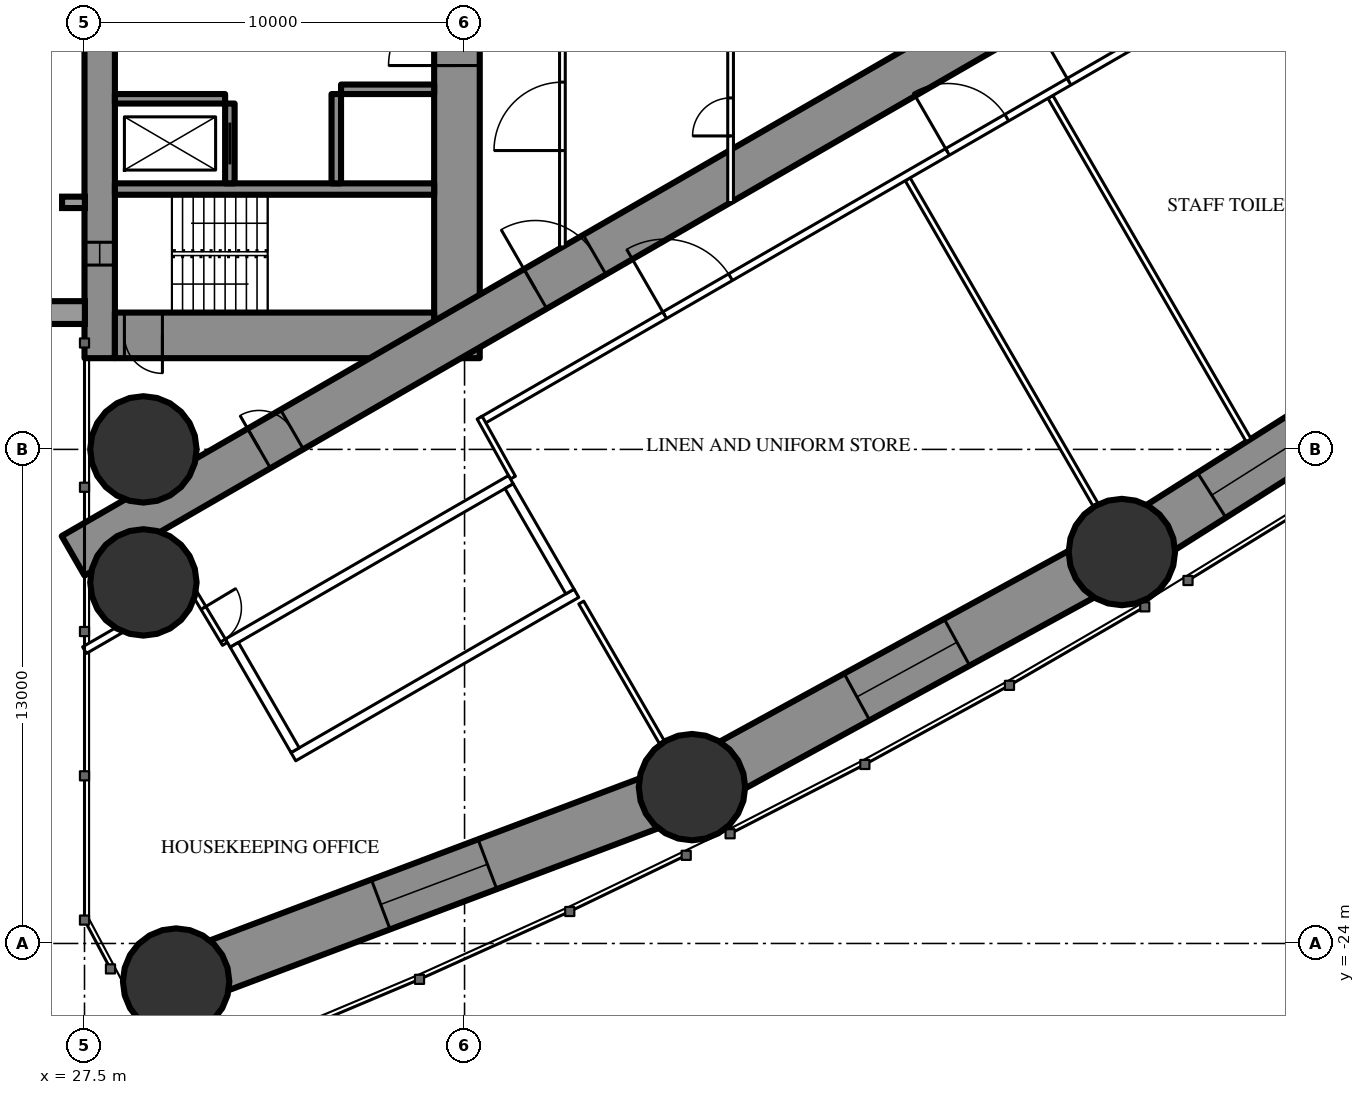
"""IFC4 building model, lengths in metres.
Left out: names, types, materials, properties, quantities, classifications, styles, units other than length and angle.
Written with IfcOpenShell. Run it as: python <this file> out.ifc"""

import sys

from ifc_helpers import new_model, si_unit, direction, frame, frame_2d, origin, origin_2d, place, context, subcontext, project, spatial, rectangle, hollow_circle, extrude, element, fill, save


model = new_model("IFC4")
c1 = context("Model", 3, precision=1e-05, world=origin(), true_north=direction((0.0, 1.0)))
c2 = subcontext(c1, "Body", "Model", "MODEL_VIEW")
j1 = project(units=[si_unit("LENGTHUNIT", "METRE"), si_unit("PLANEANGLEUNIT", "RADIAN")], contexts=[c1])
p1 = place(None, origin())
s1 = spatial("IfcSite", under=j1, at=p1, CompositionType="ELEMENT")
p2 = place(p1, origin())
s2 = spatial("IfcBuilding", under=s1, at=p2, CompositionType="ELEMENT")
p3 = place(p2, frame((0.0, 0.0, 77.5)))
s3 = spatial("IfcBuildingStorey", under=s2, at=p3, CompositionType="ELEMENT", Elevation=77.5)
for number, where, z_axis, x_axis in (
    (1, (29.911, -25.002, 0.0), (0.0, 0.0, 1.0), (1.0, 0.0, 0.0)),
    (2, (29.05, -11.0, 0.0), (0.0, 0.0, 1.0), (1.0, 0.0, 0.0)),
    (3, (29.05, -14.5, 0.0), (0.0, 0.0, 1.0), (1.0, 0.0, 0.0)),
    (4, (43.484, -19.886, 0.0), (0.0, 0.0, 1.0), (1.0, 0.0, 0.0)),
    (5, (54.795, -13.701, 0.0), (0.0, 0.0, 1.0), (1.0, 0.0, 0.0)),
):
    element("IfcColumn", number, at=place(p3, frame(where, z_axis=z_axis, x_axis=x_axis)), inside=s3, PredefinedType="COLUMN", context=c2, shape_type="SweptSolid", body=[
        extrude(hollow_circle(Radius=1.4, WallThickness=0.12, at=origin_2d()), origin(), (0.0, 0.0, 1.0), 3.5),
    ])
p4 = place(p3, frame((27.9, -8.6, 0.0), z_axis=(0.0, 0.0, 1.0), x_axis=(0.0, 1.0, 0.0)))
e6 = element("IfcWall", 6, at=p4, inside=s3, PredefinedType="SHEAR", context=c2, shape_type="SweptSolid", body=[
    extrude(rectangle(XDim=17.2, YDim=0.8, at=frame_2d((8.6, 0.0))), origin(), (0.0, 0.0, 1.0), 3.5),
])
p5 = place(p4, frame((2.45, 0.0, 0.6)))
e7 = element("IfcOpeningElement", 7, at=p5, cuts=e6, PredefinedType="OPENING", context=c2, shape_type="SweptSolid", body=[
    extrude(rectangle(XDim=0.6, YDim=2.1, at=frame_2d((0.3, 1.05))), frame((0.0, 0.41, 0.0), z_axis=(0.0, -1.0, 0.0), x_axis=(1.0, 0.0, 0.0)), (0.0, 0.0, 1.0), 0.82),
])
p6 = place(p4, frame((14.15, 0.0, 0.6)))
e8 = element("IfcOpeningElement", 8, at=p6, cuts=e6, PredefinedType="OPENING", context=c2, shape_type="SweptSolid", body=[
    extrude(rectangle(XDim=0.6, YDim=2.1, at=frame_2d((0.3, 1.05))), frame((0.0, 0.41, 0.0), z_axis=(0.0, -1.0, 0.0), x_axis=(1.0, 0.0, 0.0)), (0.0, 0.0, 1.0), 0.82),
])
p7 = place(p3, frame((37.3, -8.6, 0.0), z_axis=(0.0, 0.0, 1.0), x_axis=(0.0, 1.0, 0.0)))
e9 = element("IfcWall", 9, at=p7, inside=s3, PredefinedType="SHEAR", context=c2, shape_type="SweptSolid", body=[
    extrude(rectangle(XDim=17.2, YDim=1.2, at=frame_2d((8.6, 0.0))), origin(), (0.0, 0.0, 1.0), 3.5),
])
p8 = place(p7, frame((7.7, 0.0, 0.0)))
e10 = element("IfcOpeningElement", 10, at=p8, cuts=e9, PredefinedType="OPENING", context=c2, shape_type="SweptSolid", body=[
    extrude(rectangle(XDim=1.8, YDim=2.2, at=frame_2d((0.9, 1.1))), frame((0.0, 0.61, 0.0), z_axis=(0.0, -1.0, 0.0), x_axis=(1.0, 0.0, 0.0)), (0.0, 0.0, 1.0), 1.22),
])
p9 = place(p3, frame((28.3, -8.0, 0.0), z_axis=(0.0, 0.0, 1.0), x_axis=(1.0, 0.0, 0.0)))
e11 = element("IfcWall", 11, at=p9, inside=s3, PredefinedType="SHEAR", context=c2, shape_type="SweptSolid", body=[
    extrude(rectangle(XDim=8.4, YDim=1.2, at=frame_2d((4.2, 0.0))), origin(), (0.0, 0.0, 1.0), 3.5),
])
p10 = place(p9, frame((0.25, 0.0, 0.0)))
e12 = element("IfcOpeningElement", 12, at=p10, cuts=e11, PredefinedType="OPENING", context=c2, shape_type="SweptSolid", body=[
    extrude(rectangle(XDim=1.0, YDim=2.2, at=frame_2d((0.5, 1.1))), frame((0.0, 0.61, 0.0), z_axis=(0.0, -1.0, 0.0), x_axis=(1.0, 0.0, 0.0)), (0.0, 0.0, 1.0), 1.22),
])
p11 = place(p3, frame((28.3, -4.15, 0.0), z_axis=(0.0, 0.0, 1.0), x_axis=(1.0, 0.0, 0.0)))
e13 = element("IfcWall", 13, at=p11, inside=s3, PredefinedType="SHEAR", context=c2, shape_type="SweptSolid", body=[
    extrude(rectangle(XDim=8.4, YDim=0.3, at=frame_2d((4.2, 0.0))), origin(), (0.0, 0.0, 1.0), 3.5),
])
p12 = place(p3, frame((31.325, -4.0, 0.0), z_axis=(0.0, 0.0, 1.0), x_axis=(0.0, 1.0, 0.0)))
e14 = element("IfcWall", 14, at=p12, inside=s3, PredefinedType="SHEAR", context=c2, shape_type="SweptSolid", body=[
    extrude(rectangle(XDim=2.1, YDim=0.25, at=frame_2d((1.05, 0.0))), origin(), (0.0, 0.0, 1.0), 3.5),
])
p13 = place(p12, frame((0.5, 0.0, 0.0)))
e15 = element("IfcOpeningElement", 15, at=p13, cuts=e14, PredefinedType="OPENING", context=c2, shape_type="SweptSolid", body=[
    extrude(rectangle(XDim=1.1, YDim=2.2, at=frame_2d((0.55, 1.1))), frame((0.0, 0.135, 0.0), z_axis=(0.0, -1.0, 0.0), x_axis=(1.0, 0.0, 0.0)), (0.0, 0.0, 1.0), 0.27),
])
p14 = place(p3, frame((34.125, -4.0, 0.0), z_axis=(0.0, 0.0, 1.0), x_axis=(0.0, 1.0, 0.0)))
e16 = element("IfcWall", 16, at=p14, inside=s3, PredefinedType="SHEAR", context=c2, shape_type="SweptSolid", body=[
    extrude(rectangle(XDim=2.35, YDim=0.25, at=frame_2d((1.175, 0.0))), origin(), (0.0, 0.0, 1.0), 3.5),
])
p15 = place(p3, frame((28.3, -1.775, 0.0), z_axis=(0.0, 0.0, 1.0), x_axis=(1.0, 0.0, 0.0)))
e17 = element("IfcWall", 17, at=p15, inside=s3, PredefinedType="SHEAR", context=c2, shape_type="SweptSolid", body=[
    extrude(rectangle(XDim=2.9, YDim=0.25, at=frame_2d((1.45, 0.0))), origin(), (0.0, 0.0, 1.0), 3.5),
])
p16 = place(p3, frame((34.25, -1.525, 0.0), z_axis=(0.0, 0.0, 1.0), x_axis=(1.0, 0.0, 0.0)))
e18 = element("IfcWall", 18, at=p16, inside=s3, PredefinedType="SHEAR", context=c2, shape_type="SweptSolid", body=[
    extrude(rectangle(XDim=2.45, YDim=0.25, at=frame_2d((1.225, 0.0))), origin(), (0.0, 0.0, 1.0), 3.5),
])
p17 = place(p3, frame((27.2, -13.8, 0.0), z_axis=(0.0, 0.0, 1.0), x_axis=(0.866027159892, 0.499996958321, 0.0)))
e19 = element("IfcWall", 19, at=p17, inside=s3, PredefinedType="SHEAR", context=c2, shape_type="SweptSolid", body=[
    extrude(rectangle(XDim=27.947, YDim=1.2, at=frame_2d((13.973, 0.0))), origin(), (0.0, 0.0, 1.0), 3.5),
])
p18 = place(p17, frame((5.65, 0.0, 0.0)))
e20 = element("IfcOpeningElement", 20, at=p18, cuts=e19, PredefinedType="OPENING", context=c2, shape_type="SweptSolid", body=[
    extrude(rectangle(XDim=1.0, YDim=2.2, at=frame_2d((0.5, 1.1))), frame((0.0, 0.61, 0.0), z_axis=(0.0, -1.0, 0.0), x_axis=(1.0, 0.0, 0.0)), (0.0, 0.0, 1.0), 1.22),
])
p19 = place(p17, frame((14.045, 0.0, 0.0)))
e21 = element("IfcOpeningElement", 21, at=p19, cuts=e19, PredefinedType="OPENING", context=c2, shape_type="SweptSolid", body=[
    extrude(rectangle(XDim=1.8, YDim=2.2, at=frame_2d((0.9, 1.1))), frame((0.0, 0.61, 0.0), z_axis=(0.0, -1.0, 0.0), x_axis=(1.0, 0.0, 0.0)), (0.0, 0.0, 1.0), 1.22),
])
p20 = place(p3, frame((29.911, -25.002, 0.0), z_axis=(0.0, 0.0, 1.0), x_axis=(0.935736448066, 0.352700013836, 0.0)))
e22 = element("IfcWall", 22, at=p20, inside=s3, PredefinedType="SHEAR", context=c2, shape_type="SweptSolid", body=[
    extrude(rectangle(XDim=14.505, YDim=1.4, at=frame_2d((7.252, 0.0))), origin(), (0.0, 0.0, 1.0), 3.5),
])
p21 = place(p20, frame((5.752, 0.0, 0.6)))
e23 = element("IfcOpeningElement", 23, at=p21, cuts=e22, PredefinedType="OPENING", context=c2, shape_type="SweptSolid", body=[
    extrude(rectangle(XDim=3.0, YDim=1.2, at=frame_2d((1.5, 0.6))), frame((0.0, 0.71, 0.0), z_axis=(0.0, -1.0, 0.0), x_axis=(1.0, 0.0, 0.0)), (0.0, 0.0, 1.0), 1.42),
])
p22 = place(p3, frame((43.484, -19.886, 0.0), z_axis=(0.0, 0.0, 1.0), x_axis=(0.87736889738, 0.479816441893, 0.0)))
e24 = element("IfcWall", 24, at=p22, inside=s3, PredefinedType="SHEAR", context=c2, shape_type="SweptSolid", body=[
    extrude(rectangle(XDim=12.892, YDim=1.4, at=frame_2d((6.446, 0.0))), origin(), (0.0, 0.0, 1.0), 3.5),
])
p23 = place(p22, frame((4.946, 0.0, 0.6)))
e25 = element("IfcOpeningElement", 25, at=p23, cuts=e24, PredefinedType="OPENING", context=c2, shape_type="SweptSolid", body=[
    extrude(rectangle(XDim=3.0, YDim=1.2, at=frame_2d((1.5, 0.6))), frame((0.0, 0.71, 0.0), z_axis=(0.0, -1.0, 0.0), x_axis=(1.0, 0.0, 0.0)), (0.0, 0.0, 1.0), 1.42),
])
p24 = place(p3, frame((54.795, -13.701, 0.0), z_axis=(0.0, 0.0, 1.0), x_axis=(0.845078312276, 0.534642540508, 0.0)))
e26 = element("IfcWall", 26, at=p24, inside=s3, PredefinedType="SHEAR", context=c2, shape_type="SweptSolid", body=[
    extrude(rectangle(XDim=8.596, YDim=1.4, at=frame_2d((4.298, 0.0))), origin(), (0.0, 0.0, 1.0), 3.5),
])
p25 = place(p24, frame((2.798, 0.0, 0.6)))
e27 = element("IfcOpeningElement", 27, at=p25, cuts=e26, PredefinedType="OPENING", context=c2, shape_type="SweptSolid", body=[
    extrude(rectangle(XDim=3.0, YDim=1.2, at=frame_2d((1.5, 0.6))), frame((0.0, 0.71, 0.0), z_axis=(0.0, -1.0, 0.0), x_axis=(1.0, 0.0, 0.0)), (0.0, 0.0, 1.0), 1.42),
])
p26 = place(p3, frame((49.159, -3.893, 0.0), z_axis=(0.0, 0.0, 1.0), x_axis=(0.499998773722, -0.866026111775, 0.0)))
e28 = element("IfcWall", 28, at=p26, inside=s3, PredefinedType="PARTITIONING", context=c2, shape_type="SweptSolid", body=[
    extrude(rectangle(XDim=9.892, YDim=0.15, at=frame_2d((4.946, 0.0))), origin(), (0.0, 0.0, 1.0), 2.05),
])
p27 = place(p3, frame((52.915, -1.725, 0.0), z_axis=(0.0, 0.0, 1.0), x_axis=(0.499991830914, -0.866030120157, 0.0)))
e29 = element("IfcWall", 29, at=p27, inside=s3, PredefinedType="PARTITIONING", context=c2, shape_type="SweptSolid", body=[
    extrude(rectangle(XDim=10.434, YDim=0.15, at=frame_2d((5.217, 0.0))), origin(), (0.0, 0.0, 1.0), 3.25),
])
p28 = place(p3, frame((40.57, -15.03, 0.0), z_axis=(0.0, 0.0, 1.0), x_axis=(0.500012993597, -0.866017901798, 0.0)))
e30 = element("IfcWall", 30, at=p28, inside=s3, PredefinedType="PARTITIONING", context=c2, shape_type="SweptSolid", body=[
    extrude(rectangle(XDim=4.243, YDim=0.15, at=frame_2d((2.122, 0.0))), origin(), (0.0, 0.0, 1.0), 3.25),
])
p29 = place(p3, frame((27.5, -16.282, 0.0), z_axis=(0.0, 0.0, 1.0), x_axis=(0.866039938485, 0.499974824316, 0.0)))
e31 = element("IfcWall", 31, at=p29, inside=s3, PredefinedType="PARTITIONING", context=c2, shape_type="SweptSolid", body=[
    extrude(rectangle(XDim=3.238, YDim=0.2, at=frame_2d((1.619, 0.0))), origin(), (0.0, 0.0, 1.0), 3.25),
])
p30 = place(p3, frame((37.96, -10.243, 0.0), z_axis=(0.0, 0.0, 1.0), x_axis=(0.866026429433, 0.499998223521, 0.0)))
e32 = element("IfcWall", 32, at=p30, inside=s3, PredefinedType="PARTITIONING", context=c2, shape_type="SweptSolid", body=[
    extrude(rectangle(XDim=20.487, YDim=0.2, at=frame_2d((10.243, 0.0))), origin(), (0.0, 0.0, 1.0), 3.25),
])
p31 = place(p30, frame((14.142, 0.0, 0.0)))
e33 = element("IfcOpeningElement", 33, at=p31, cuts=e32, PredefinedType="OPENING", context=c2, shape_type="SweptSolid", body=[
    extrude(rectangle(XDim=1.8, YDim=2.2, at=frame_2d((0.9, 1.1))), frame((0.0, 0.11, 0.0), z_axis=(0.0, -1.0, 0.0), x_axis=(1.0, 0.0, 0.0)), (0.0, 0.0, 1.0), 0.22),
])
p32 = place(p30, frame((17.836, 0.0, 0.0)))
e34 = element("IfcOpeningElement", 34, at=p32, cuts=e32, PredefinedType="OPENING", context=c2, shape_type="SweptSolid", body=[
    extrude(rectangle(XDim=1.8, YDim=2.04, at=frame_2d((0.9, 1.02))), frame((0.0, 0.11, 0.0), z_axis=(0.0, -1.0, 0.0), x_axis=(1.0, 0.0, 0.0)), (0.0, 0.0, 1.0), 0.22),
])
p33 = place(p30, frame((5.55, 0.0, 0.0)))
e35 = element("IfcOpeningElement", 35, at=p33, cuts=e32, PredefinedType="OPENING", context=c2, shape_type="SweptSolid", body=[
    extrude(rectangle(XDim=2.0, YDim=2.4, at=frame_2d((1.0, 1.2))), frame((0.0, 0.11, 0.0), z_axis=(0.0, -1.0, 0.0), x_axis=(1.0, 0.0, 0.0)), (0.0, 0.0, 1.0), 0.22),
])
p34 = place(p3, frame((30.267, -14.569, 0.0), z_axis=(0.0, 0.0, 1.0), x_axis=(0.514336634837, -0.857588377991, 0.0)))
e36 = element("IfcWall", 36, at=p34, inside=s3, PredefinedType="PARTITIONING", context=c2, shape_type="SweptSolid", body=[
    extrude(rectangle(XDim=1.805, YDim=0.15, at=frame_2d((0.903, 0.0))), origin(), (0.0, 0.0, 1.0), 3.25),
])
p35 = place(p34, frame((0.703, 0.0, 0.0)))
e37 = element("IfcOpeningElement", 37, at=p35, cuts=e36, PredefinedType="OPENING", context=c2, shape_type="SweptSolid", body=[
    extrude(rectangle(XDim=1.0, YDim=2.04, at=frame_2d((0.5, 1.02))), frame((0.0, 0.085, 0.0), z_axis=(0.0, -1.0, 0.0), x_axis=(1.0, 0.0, 0.0)), (0.0, 0.0, 1.0), 0.17),
])
p36 = place(p3, frame((38.773, -11.742, 0.0), z_axis=(0.0, 0.0, 1.0), x_axis=(-0.485528096672, 0.8742210632, 0.0)))
e38 = element("IfcWall", 38, at=p36, inside=s3, PredefinedType="PARTITIONING", context=c2, shape_type="SweptSolid", body=[
    extrude(rectangle(XDim=1.805, YDim=0.15, at=frame_2d((0.903, 0.0))), origin(), (0.0, 0.0, 1.0), 3.25),
])
p37 = place(p3, frame((40.075, -5.674, 0.0), z_axis=(0.0, 0.0, 1.0), x_axis=(0.0, 1.0, 0.0)))
e39 = element("IfcWall", 39, at=p37, inside=s3, PredefinedType="PARTITIONING", context=c2, shape_type="SweptSolid", body=[
    extrude(rectangle(XDim=6.874, YDim=0.15, at=frame_2d((3.437, 0.0))), origin(), (0.0, 0.0, 1.0), 3.25),
])
p38 = place(p37, frame((2.537, 0.0, 0.0)))
e40 = element("IfcOpeningElement", 40, at=p38, cuts=e39, PredefinedType="OPENING", context=c2, shape_type="SweptSolid", body=[
    extrude(rectangle(XDim=1.8, YDim=2.2, at=frame_2d((0.9, 1.1))), frame((0.0, 0.085, 0.0), z_axis=(0.0, -1.0, 0.0), x_axis=(1.0, 0.0, 0.0)), (0.0, 0.0, 1.0), 0.17),
])
p39 = place(p3, frame((44.5, -4.505, 0.0), z_axis=(0.0, 0.0, 1.0), x_axis=(0.0, 1.0, 0.0)))
e41 = element("IfcWall", 41, at=p39, inside=s3, PredefinedType="PARTITIONING", context=c2, shape_type="SweptSolid", body=[
    extrude(rectangle(XDim=9.009, YDim=0.15, at=frame_2d((4.505, 0.0))), origin(), (0.0, 0.0, 1.0), 3.25),
])
p40 = place(p39, frame((1.752, 0.0, 0.0)))
e42 = element("IfcOpeningElement", 42, at=p40, cuts=e41, PredefinedType="OPENING", context=c2, shape_type="SweptSolid", body=[
    extrude(rectangle(XDim=1.0, YDim=2.2, at=frame_2d((0.5, 1.1))), frame((0.0, 0.085, 0.0), z_axis=(0.0, -1.0, 0.0), x_axis=(1.0, 0.0, 0.0)), (0.0, 0.0, 1.0), 0.17),
])
p41 = place(p39, frame((6.257, 0.0, 0.0)))
e43 = element("IfcOpeningElement", 43, at=p41, cuts=e41, PredefinedType="OPENING", context=c2, shape_type="SweptSolid", body=[
    extrude(rectangle(XDim=1.0, YDim=2.2, at=frame_2d((0.5, 1.1))), frame((0.0, 0.085, 0.0), z_axis=(0.0, -1.0, 0.0), x_axis=(1.0, 0.0, 0.0)), (0.0, 0.0, 1.0), 0.17),
])
for number, where, z_axis, x_axis in (
    (44, (31.271, -16.097, 0.0), (0.0, 0.0, 1.0), (0.866, 0.5, 0.0)),
    (45, (32.996, -19.086, 0.0), (0.0, 0.0, 1.0), (0.866, 0.5, 0.0)),
):
    element("IfcWall", number, at=place(p3, frame(where, z_axis=z_axis, x_axis=x_axis)), inside=s3, PredefinedType="PARTITIONING", context=c2, shape_type="SweptSolid", body=[
        extrude(rectangle(XDim=8.6, YDim=0.25, at=frame_2d((4.3, 0.0))), origin(), (0.0, 0.0, 1.0), 3.25),
    ])
for number, where, z_axis, x_axis in (
    (46, (31.441, -16.143, 0.0), (0.0, 0.0, 1.0), (0.5, -0.866, 0.0)),
    (47, (38.673, -11.968, 0.0), (0.0, 0.0, 1.0), (0.5, -0.866, 0.0)),
):
    element("IfcWall", number, at=place(p3, frame(where, z_axis=z_axis, x_axis=x_axis)), inside=s3, PredefinedType="PARTITIONING", context=c2, shape_type="SweptSolid", body=[
        extrude(rectangle(XDim=3.201, YDim=0.25, at=frame_2d((1.6, 0.0))), origin(), (0.0, 0.0, 1.0), 3.25),
    ])
p42 = place(p21, origin())
e48 = element("IfcWindow", 48, at=p42, inside=s3, PartitioningType="SINGLE_PANEL", PredefinedType="WINDOW", context=c2, shape_type="SweptSolid", body=[
    extrude(rectangle(XDim=3.0, YDim=1.2, at=frame_2d((1.5, 0.6))), frame((0.0, 0.03, 0.0), z_axis=(0.0, -1.0, 0.0), x_axis=(1.0, 0.0, 0.0)), (0.0, 0.0, 1.0), 0.06),
])
fill(e23, e48)
p43 = place(p23, origin())
e49 = element("IfcWindow", 49, at=p43, inside=s3, PartitioningType="SINGLE_PANEL", PredefinedType="WINDOW", context=c2, shape_type="SweptSolid", body=[
    extrude(rectangle(XDim=3.0, YDim=1.2, at=frame_2d((1.5, 0.6))), frame((0.0, 0.03, 0.0), z_axis=(0.0, -1.0, 0.0), x_axis=(1.0, 0.0, 0.0)), (0.0, 0.0, 1.0), 0.06),
])
fill(e25, e49)
p44 = place(p25, origin())
e50 = element("IfcWindow", 50, at=p44, inside=s3, PartitioningType="SINGLE_PANEL", PredefinedType="WINDOW", context=c2, shape_type="SweptSolid", body=[
    extrude(rectangle(XDim=3.0, YDim=1.2, at=frame_2d((1.5, 0.6))), frame((0.0, 0.03, 0.0), z_axis=(0.0, -1.0, 0.0), x_axis=(1.0, 0.0, 0.0)), (0.0, 0.0, 1.0), 0.06),
])
fill(e27, e50)
p45 = place(p31, origin())
e51 = element("IfcDoor", 51, at=p45, inside=s3, OperationType="DOUBLE_DOOR_SINGLE_SWING", PredefinedType="DOOR", context=c2, shape_type="SweptSolid", body=[
    extrude(rectangle(XDim=1.8, YDim=2.2, at=frame_2d((0.9, 1.1))), frame((0.0, 0.025, 0.0), z_axis=(0.0, -1.0, 0.0), x_axis=(1.0, 0.0, 0.0)), (0.0, 0.0, 1.0), 0.05),
])
fill(e33, e51)
p46 = place(p32, origin())
e52 = element("IfcDoor", 52, at=p46, inside=s3, OperationType="DOUBLE_DOOR_SINGLE_SWING", PredefinedType="DOOR", context=c2, shape_type="SweptSolid", body=[
    extrude(rectangle(XDim=1.8, YDim=2.04, at=frame_2d((0.9, 1.02))), frame((0.0, 0.025, 0.0), z_axis=(0.0, -1.0, 0.0), x_axis=(1.0, 0.0, 0.0)), (0.0, 0.0, 1.0), 0.05),
])
fill(e34, e52)
p47 = place(p35, origin())
e53 = element("IfcDoor", 53, at=p47, inside=s3, OperationType="SINGLE_SWING_LEFT", PredefinedType="DOOR", context=c2, shape_type="SweptSolid", body=[
    extrude(rectangle(XDim=1.0, YDim=2.04, at=frame_2d((0.5, 1.02))), frame((0.0, 0.025, 0.0), z_axis=(0.0, -1.0, 0.0), x_axis=(1.0, 0.0, 0.0)), (0.0, 0.0, 1.0), 0.05),
])
fill(e37, e53)
p48 = place(p33, origin())
e54 = element("IfcDoor", 54, at=p48, inside=s3, OperationType="DOUBLE_DOOR_SINGLE_SWING", PredefinedType="DOOR", context=c2, shape_type="SweptSolid", body=[
    extrude(rectangle(XDim=2.0, YDim=2.4, at=frame_2d((1.0, 1.2))), frame((0.0, 0.025, 0.0), z_axis=(0.0, -1.0, 0.0), x_axis=(1.0, 0.0, 0.0)), (0.0, 0.0, 1.0), 0.05),
])
fill(e35, e54)
p49 = place(p38, origin())
e55 = element("IfcDoor", 55, at=p49, inside=s3, OperationType="DOUBLE_DOOR_SINGLE_SWING", PredefinedType="DOOR", context=c2, shape_type="SweptSolid", body=[
    extrude(rectangle(XDim=1.8, YDim=2.2, at=frame_2d((0.9, 1.1))), frame((0.0, 0.025, 0.0), z_axis=(0.0, -1.0, 0.0), x_axis=(1.0, 0.0, 0.0)), (0.0, 0.0, 1.0), 0.05),
])
fill(e40, e55)
p50 = place(p40, origin())
e56 = element("IfcDoor", 56, at=p50, inside=s3, OperationType="SINGLE_SWING_LEFT", PredefinedType="DOOR", context=c2, shape_type="SweptSolid", body=[
    extrude(rectangle(XDim=1.0, YDim=2.2, at=frame_2d((0.5, 1.1))), frame((0.0, 0.025, 0.0), z_axis=(0.0, -1.0, 0.0), x_axis=(1.0, 0.0, 0.0)), (0.0, 0.0, 1.0), 0.05),
])
fill(e42, e56)
p51 = place(p18, origin())
e57 = element("IfcDoor", 57, at=p51, inside=s3, OperationType="SINGLE_SWING_LEFT", PredefinedType="DOOR", context=c2, shape_type="SweptSolid", body=[
    extrude(rectangle(XDim=1.0, YDim=2.2, at=frame_2d((0.5, 1.1))), frame((0.0, 0.025, 0.0), z_axis=(0.0, -1.0, 0.0), x_axis=(1.0, 0.0, 0.0)), (0.0, 0.0, 1.0), 0.05),
])
fill(e20, e57)
p52 = place(p19, origin())
e58 = element("IfcDoor", 58, at=p52, inside=s3, OperationType="DOUBLE_DOOR_SINGLE_SWING", PredefinedType="DOOR", context=c2, shape_type="SweptSolid", body=[
    extrude(rectangle(XDim=1.8, YDim=2.2, at=frame_2d((0.9, 1.1))), frame((0.0, 0.025, 0.0), z_axis=(0.0, -1.0, 0.0), x_axis=(1.0, 0.0, 0.0)), (0.0, 0.0, 1.0), 0.05),
])
fill(e21, e58)
p53 = place(p8, origin())
e59 = element("IfcDoor", 59, at=p53, inside=s3, OperationType="DOUBLE_DOOR_SINGLE_SWING", PredefinedType="DOOR", context=c2, shape_type="SweptSolid", body=[
    extrude(rectangle(XDim=1.8, YDim=2.2, at=frame_2d((0.9, 1.1))), frame((0.0, 0.025, 0.0), z_axis=(0.0, -1.0, 0.0), x_axis=(1.0, 0.0, 0.0)), (0.0, 0.0, 1.0), 0.05),
])
fill(e10, e59)
p54 = place(p10, origin())
e60 = element("IfcDoor", 60, at=p54, inside=s3, OperationType="SINGLE_SWING_RIGHT", PredefinedType="DOOR", context=c2, shape_type="SweptSolid", body=[
    extrude(rectangle(XDim=1.0, YDim=2.2, at=frame_2d((0.5, 1.1))), frame((0.0, 0.025, 0.0), z_axis=(0.0, -1.0, 0.0), x_axis=(1.0, 0.0, 0.0)), (0.0, 0.0, 1.0), 0.05),
])
fill(e12, e60)
p55 = place(p13, origin())
e61 = element("IfcDoor", 61, at=p55, inside=s3, OperationType="SLIDING_TO_LEFT", PredefinedType="USERDEFINED", context=c2, shape_type="SweptSolid", body=[
    extrude(rectangle(XDim=1.1, YDim=2.2, at=frame_2d((0.55, 1.1))), frame((0.0, 0.025, 0.0), z_axis=(0.0, -1.0, 0.0), x_axis=(1.0, 0.0, 0.0)), (0.0, 0.0, 1.0), 0.05),
])
fill(e15, e61)
p56 = place(p5, origin())
e62 = element("IfcWindow", 62, at=p56, inside=s3, PartitioningType="SINGLE_PANEL", PredefinedType="WINDOW", context=c2, shape_type="SweptSolid", body=[
    extrude(rectangle(XDim=0.6, YDim=2.1, at=frame_2d((0.3, 1.05))), frame((0.0, 0.03, 0.0), z_axis=(0.0, -1.0, 0.0), x_axis=(1.0, 0.0, 0.0)), (0.0, 0.0, 1.0), 0.06),
])
fill(e7, e62)
save(model, sys.argv[1])
